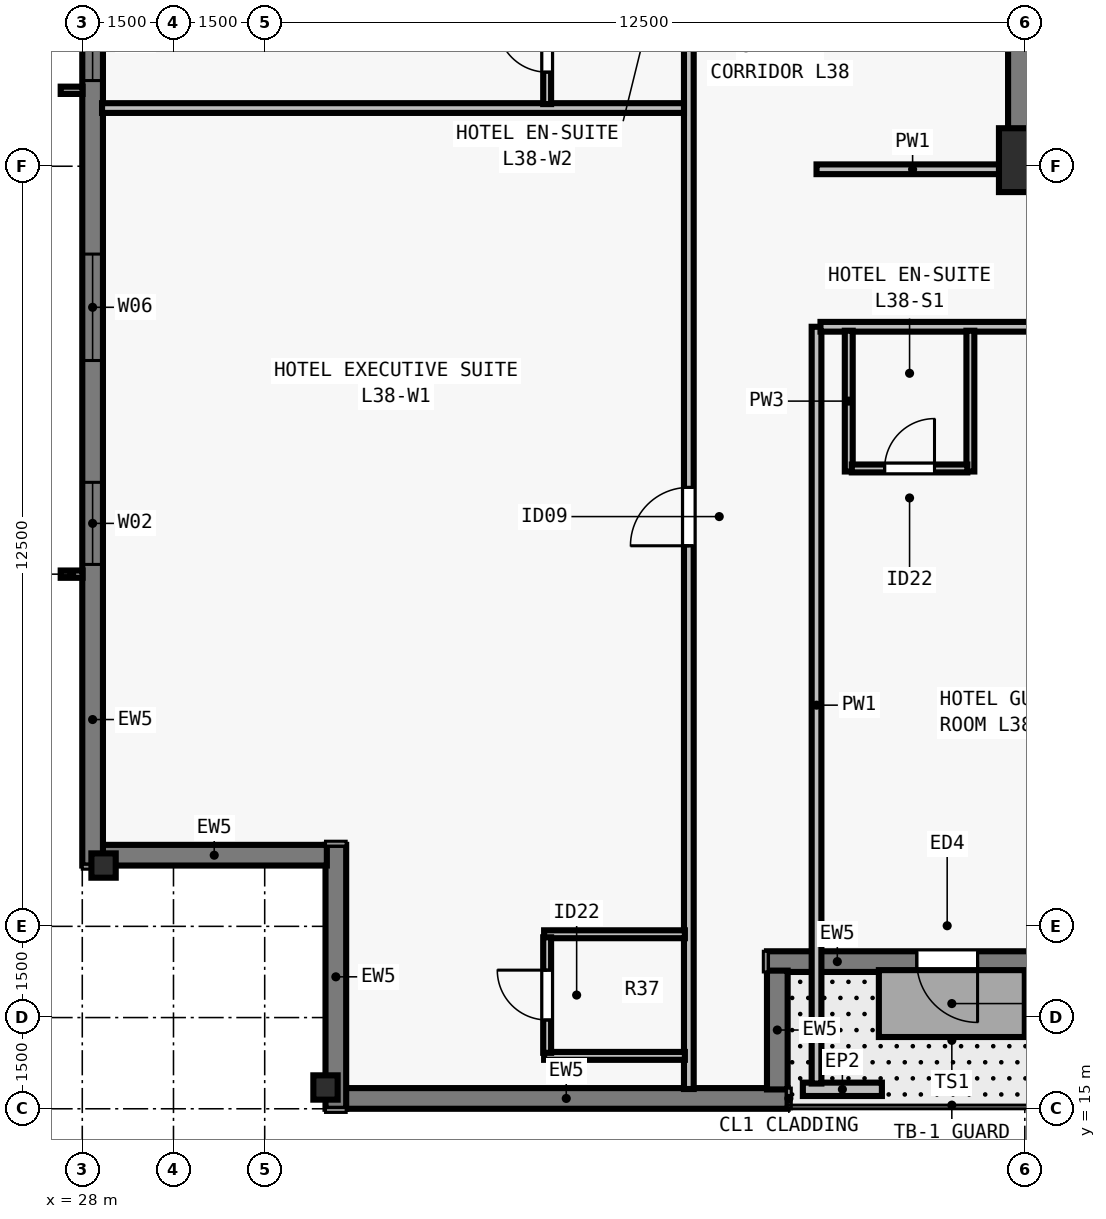
"""IFC4 building model, lengths in metres.
Left out: names, types, materials, properties, quantities, classifications, styles, units other than length and angle.
Written with IfcOpenShell. Run it as: python <this file> out.ifc"""

import sys

from ifc_helpers import new_model, si_unit, direction, frame, frame_2d, origin, origin_2d, place, context, subcontext, project, spatial, rectangle, i_section, extrude, element, fill, save


model = new_model("IFC4")
c1 = context("Model", 3, precision=1e-05, world=origin(), true_north=direction((0.0, 1.0)))
c2 = subcontext(c1, "Body", "Model", "MODEL_VIEW")
j1 = project(units=[si_unit("LENGTHUNIT", "METRE"), si_unit("PLANEANGLEUNIT", "RADIAN")], contexts=[c1])
p1 = place(None, origin())
s1 = spatial("IfcSite", under=j1, at=p1, CompositionType="ELEMENT")
p2 = place(p1, origin())
s2 = spatial("IfcBuilding", under=s1, at=p2, CompositionType="ELEMENT")
p3 = place(p2, frame((0.0, 0.0, 141.0)))
s3 = spatial("IfcBuildingStorey", under=s2, at=p3, CompositionType="ELEMENT", Elevation=141.0)
p4 = place(p3, frame((43.6, 30.6, 0.0), z_axis=(0.0, 0.0, 1.0), x_axis=(1.0, 0.0, 0.0)))
e1 = element("IfcColumn", 1, at=p4, inside=s3, PredefinedType="COLUMN", context=c2, shape_type="SweptSolid", body=[
    extrude(rectangle(XDim=1.05, YDim=1.05, at=origin_2d()), origin(), (0.0, 0.0, 1.0), 3.5),
])
for number, where, z_axis, x_axis in (
    (2, (32.0, 15.35, 0.0), (0.0, 0.0, 1.0), (1.0, 0.0, 0.0)),
    (3, (28.35, 19.0, 0.0), (0.0, 0.0, 1.0), (0.0, 1.0, 0.0)),
):
    element("IfcColumn", number, at=place(p3, frame(where, z_axis=z_axis, x_axis=x_axis)), inside=s3, PredefinedType="COLUMN", context=c2, shape_type="SweptSolid", body=[
        extrude(i_section(OverallWidth=0.4, OverallDepth=0.4, WebThickness=0.022, FlangeThickness=0.036, at=origin_2d()), origin(), (0.0, 0.0, 1.0), 3.5),
    ])
p5 = place(p3, frame((39.6, 15.17, 0.0), z_axis=(0.0, 0.0, 1.0), x_axis=(-1.0, 0.0, 0.0)))
e4 = element("IfcWall", 4, at=p5, inside=s3, PredefinedType="SOLIDWALL", context=c2, shape_type="SweptSolid", body=[
    extrude(rectangle(XDim=7.282, YDim=0.34, at=frame_2d((3.641, 0.0))), origin(), (0.0, 0.0, 1.0), 3.28),
])
p6 = place(p3, frame((32.17, 15.0, 0.0), z_axis=(0.0, 0.0, 1.0), x_axis=(0.0, 1.0, 0.0)))
e5 = element("IfcWall", 5, at=p6, inside=s3, PredefinedType="SOLIDWALL", context=c2, shape_type="SweptSolid", body=[
    extrude(rectangle(XDim=4.34, YDim=0.34, at=frame_2d((2.17, 0.0))), origin(), (0.0, 0.0, 1.0), 3.28),
])
p7 = place(p3, frame((32.022, 19.17, 0.0), z_axis=(0.0, 0.0, 1.0), x_axis=(-1.0, 0.0, 0.0)))
e6 = element("IfcWall", 6, at=p7, inside=s3, PredefinedType="SOLIDWALL", context=c2, shape_type="SweptSolid", body=[
    extrude(rectangle(XDim=3.704, YDim=0.34, at=frame_2d((1.852, 0.0))), origin(), (0.0, 0.0, 1.0), 3.28),
])
p8 = place(p3, frame((28.17, 19.0, 0.0), z_axis=(0.0, 0.0, 1.0), x_axis=(0.0, 1.0, 0.0)))
e7 = element("IfcWall", 7, at=p8, inside=s3, PredefinedType="SOLIDWALL", context=c2, shape_type="SweptSolid", body=[
    extrude(rectangle(XDim=39.682, YDim=0.34, at=frame_2d((19.841, 0.0))), origin(), (0.0, 0.0, 1.0), 3.28),
])
p9 = place(p8, frame((4.952, 0.0, 0.8)))
e8 = element("IfcOpeningElement", 8, at=p9, cuts=e7, PredefinedType="OPENING", context=c2, shape_type="SweptSolid", body=[
    extrude(rectangle(XDim=1.35, YDim=1.66, at=frame_2d((0.675, 0.83))), frame((0.0, 0.18, 0.0), z_axis=(0.0, -1.0, 0.0), x_axis=(1.0, 0.0, 0.0)), (0.0, 0.0, 1.0), 0.36),
])
p10 = place(p8, frame((8.305, 0.0, 0.8)))
e9 = element("IfcOpeningElement", 9, at=p10, cuts=e7, PredefinedType="OPENING", context=c2, shape_type="SweptSolid", body=[
    extrude(rectangle(XDim=1.75, YDim=1.66, at=frame_2d((0.875, 0.83))), frame((0.0, 0.18, 0.0), z_axis=(0.0, -1.0, 0.0), x_axis=(1.0, 0.0, 0.0)), (0.0, 0.0, 1.0), 0.36),
])
p11 = place(p8, frame((12.909, 0.0, 0.8)))
e10 = element("IfcOpeningElement", 10, at=p11, cuts=e7, PredefinedType="OPENING", context=c2, shape_type="SweptSolid", body=[
    extrude(rectangle(XDim=1.35, YDim=1.66, at=frame_2d((0.675, 0.83))), frame((0.0, 0.18, 0.0), z_axis=(0.0, -1.0, 0.0), x_axis=(1.0, 0.0, 0.0)), (0.0, 0.0, 1.0), 0.36),
])
p12 = place(p8, frame((16.262, 0.0, 0.8)))
e11 = element("IfcOpeningElement", 11, at=p12, cuts=e7, PredefinedType="OPENING", context=c2, shape_type="SweptSolid", body=[
    extrude(rectangle(XDim=1.75, YDim=1.66, at=frame_2d((0.875, 0.83))), frame((0.0, 0.18, 0.0), z_axis=(0.0, -1.0, 0.0), x_axis=(1.0, 0.0, 0.0)), (0.0, 0.0, 1.0), 0.36),
])
p13 = place(p8, frame((19.166, 0.0, 0.8)))
e12 = element("IfcOpeningElement", 12, at=p13, cuts=e7, PredefinedType="OPENING", context=c2, shape_type="SweptSolid", body=[
    extrude(rectangle(XDim=1.35, YDim=1.66, at=frame_2d((0.675, 0.83))), frame((0.0, 0.18, 0.0), z_axis=(0.0, -1.0, 0.0), x_axis=(1.0, 0.0, 0.0)), (0.0, 0.0, 1.0), 0.36),
])
p14 = place(p8, frame((22.07, 0.0, 0.8)))
e13 = element("IfcOpeningElement", 13, at=p14, cuts=e7, PredefinedType="OPENING", context=c2, shape_type="SweptSolid", body=[
    extrude(rectangle(XDim=1.75, YDim=1.66, at=frame_2d((0.875, 0.83))), frame((0.0, 0.18, 0.0), z_axis=(0.0, -1.0, 0.0), x_axis=(1.0, 0.0, 0.0)), (0.0, 0.0, 1.0), 0.36),
])
p15 = place(p8, frame((25.823, 0.0, 0.8)))
e14 = element("IfcOpeningElement", 14, at=p15, cuts=e7, PredefinedType="OPENING", context=c2, shape_type="SweptSolid", body=[
    extrude(rectangle(XDim=1.35, YDim=1.66, at=frame_2d((0.675, 0.83))), frame((0.0, 0.18, 0.0), z_axis=(0.0, -1.0, 0.0), x_axis=(1.0, 0.0, 0.0)), (0.0, 0.0, 1.0), 0.36),
])
p16 = place(p8, frame((29.627, 0.0, 0.8)))
e15 = element("IfcOpeningElement", 15, at=p16, cuts=e7, PredefinedType="OPENING", context=c2, shape_type="SweptSolid", body=[
    extrude(rectangle(XDim=1.75, YDim=1.66, at=frame_2d((0.875, 0.83))), frame((0.0, 0.18, 0.0), z_axis=(0.0, -1.0, 0.0), x_axis=(1.0, 0.0, 0.0)), (0.0, 0.0, 1.0), 0.36),
])
p17 = place(p8, frame((33.38, 0.0, 0.8)))
e16 = element("IfcOpeningElement", 16, at=p17, cuts=e7, PredefinedType="OPENING", context=c2, shape_type="SweptSolid", body=[
    extrude(rectangle(XDim=1.35, YDim=1.66, at=frame_2d((0.675, 0.83))), frame((0.0, 0.18, 0.0), z_axis=(0.0, -1.0, 0.0), x_axis=(1.0, 0.0, 0.0)), (0.0, 0.0, 1.0), 0.36),
])
p18 = place(p3, frame((45.022, 17.42, 0.0), z_axis=(0.0, 0.0, 1.0), x_axis=(-1.0, 0.0, 0.0)))
e17 = element("IfcWall", 17, at=p18, inside=s3, PredefinedType="SOLIDWALL", context=c2, shape_type="SweptSolid", body=[
    extrude(rectangle(XDim=5.762, YDim=0.34, at=frame_2d((2.881, 0.0))), origin(), (0.0, 0.0, 1.0), 3.28),
])
p19 = place(p18, frame((2.299, 0.0, 0.0)))
e18 = element("IfcOpeningElement", 18, at=p19, cuts=e17, PredefinedType="OPENING", context=c2, shape_type="SweptSolid", body=[
    extrude(rectangle(XDim=1.0, YDim=2.15, at=frame_2d((0.5, 1.075))), frame((0.0, 0.18, 0.0), z_axis=(0.0, -1.0, 0.0), x_axis=(1.0, 0.0, 0.0)), (0.0, 0.0, 1.0), 0.36),
])
p20 = place(p3, frame((39.43, 17.272, 0.0), z_axis=(0.0, 0.0, 1.0), x_axis=(0.0, -1.0, 0.0)))
e19 = element("IfcWall", 19, at=p20, inside=s3, PredefinedType="SOLIDWALL", context=c2, shape_type="SweptSolid", body=[
    extrude(rectangle(XDim=1.954, YDim=0.34, at=frame_2d((0.977, 0.0))), origin(), (0.0, 0.0, 1.0), 3.28),
])
p21 = place(p3, frame((39.85, 15.32, 0.0), z_axis=(0.0, 0.0, 1.0), x_axis=(1.0, 0.0, 0.0)))
e20 = element("IfcWall", 20, at=p21, inside=s3, PredefinedType="PARAPET", context=c2, shape_type="SweptSolid", body=[
    extrude(rectangle(XDim=1.3, YDim=0.22, at=frame_2d((0.65, 0.0))), origin(), (0.0, 0.0, 1.0), 0.55),
])
p22 = place(p3, frame((43.225, 30.5, 0.0), z_axis=(0.0, 0.0, 1.0), x_axis=(1.0, 0.0, 0.0)))
e21 = element("IfcWall", 21, at=p22, inside=s3, PredefinedType="SHEAR", context=c2, shape_type="SweptSolid", body=[
    extrude(rectangle(XDim=17.55, YDim=0.55, at=frame_2d((8.775, 0.0))), origin(), (0.0, 0.0, 1.0), 3.28),
])
p23 = place(p3, frame((43.5, 30.765, 0.0), z_axis=(0.0, 0.0, 1.0), x_axis=(0.0, 1.0, 0.0)))
e22 = element("IfcWall", 22, at=p23, inside=s3, PredefinedType="SHEAR", context=c2, shape_type="SweptSolid", body=[
    extrude(rectangle(XDim=7.985, YDim=0.55, at=frame_2d((3.993, 0.0))), origin(), (0.0, 0.0, 1.0), 3.28),
])
p24 = place(p3, frame((37.975, 15.325, 0.0), z_axis=(0.0, 0.0, 1.0), x_axis=(0.0, 1.0, 0.0)))
e23 = element("IfcWall", 23, at=p24, inside=s3, PredefinedType="PARTITIONING", context=c2, shape_type="SweptSolid", body=[
    extrude(rectangle(XDim=47.35, YDim=0.16, at=frame_2d((23.675, 0.0))), origin(), (0.0, 0.0, 1.0), 2.555),
])
p25 = place(p24, frame((8.934, 0.0, 0.0)))
e24 = element("IfcOpeningElement", 24, at=p25, cuts=e23, PredefinedType="OPENING", context=c2, shape_type="SweptSolid", body=[
    extrude(rectangle(XDim=0.96, YDim=2.15, at=frame_2d((0.48, 1.075))), frame((0.0, 0.09, 0.0), z_axis=(0.0, -1.0, 0.0), x_axis=(1.0, 0.0, 0.0)), (0.0, 0.0, 1.0), 0.18),
])
p26 = place(p24, frame((24.319, 0.0, 0.0)))
e25 = element("IfcOpeningElement", 25, at=p26, cuts=e23, PredefinedType="OPENING", context=c2, shape_type="SweptSolid", body=[
    extrude(rectangle(XDim=0.96, YDim=2.15, at=frame_2d((0.48, 1.075))), frame((0.0, 0.09, 0.0), z_axis=(0.0, -1.0, 0.0), x_axis=(1.0, 0.0, 0.0)), (0.0, 0.0, 1.0), 0.18),
])
p27 = place(p24, frame((39.88, 0.0, 0.0)))
e26 = element("IfcOpeningElement", 26, at=p27, cuts=e23, PredefinedType="OPENING", context=c2, shape_type="SweptSolid", body=[
    extrude(rectangle(XDim=0.96, YDim=2.15, at=frame_2d((0.48, 1.075))), frame((0.0, 0.09, 0.0), z_axis=(0.0, -1.0, 0.0), x_axis=(1.0, 0.0, 0.0)), (0.0, 0.0, 1.0), 0.18),
])
p28 = place(p3, frame((40.075, 15.415, 0.0), z_axis=(0.0, 0.0, 1.0), x_axis=(0.0, 1.0, 0.0)))
e27 = element("IfcWall", 27, at=p28, inside=s3, PredefinedType="PARTITIONING", context=c2, shape_type="SweptSolid", body=[
    extrude(rectangle(XDim=12.445, YDim=0.16, at=frame_2d((6.223, 0.0))), origin(), (0.0, 0.0, 1.0), 2.555),
])
p29 = place(p3, frame((40.075, 30.45, 0.0), z_axis=(0.0, 0.0, 1.0), x_axis=(1.0, 0.0, 0.0)))
e28 = element("IfcWall", 28, at=p29, inside=s3, PredefinedType="PARTITIONING", context=c2, shape_type="SweptSolid", body=[
    extrude(rectangle(XDim=3.16, YDim=0.16, at=frame_2d((1.58, 0.0))), origin(), (0.0, 0.0, 1.0), 3.28),
])
p30 = place(p3, frame((40.14, 27.86, 0.0), z_axis=(0.0, 0.0, 1.0), x_axis=(1.0, 0.0, 0.0)))
e29 = element("IfcWall", 29, at=p30, inside=s3, PredefinedType="PARTITIONING", context=c2, shape_type="SweptSolid", body=[
    extrude(rectangle(XDim=22.07, YDim=0.16, at=frame_2d((11.035, 0.0))), origin(), (0.0, 0.0, 1.0), 3.28),
])
p31 = place(p30, frame((3.834, 0.0, 0.0)))
e30 = element("IfcOpeningElement", 30, at=p31, cuts=e29, PredefinedType="OPENING", context=c2, shape_type="SweptSolid", body=[
    extrude(rectangle(XDim=0.96, YDim=2.15, at=frame_2d((0.48, 1.075))), frame((0.0, 0.09, 0.0), z_axis=(0.0, -1.0, 0.0), x_axis=(1.0, 0.0, 0.0)), (0.0, 0.0, 1.0), 0.18),
])
p32 = place(p30, frame((8.746, 0.0, 0.0)))
e31 = element("IfcOpeningElement", 31, at=p32, cuts=e29, PredefinedType="OPENING", context=c2, shape_type="SweptSolid", body=[
    extrude(rectangle(XDim=0.96, YDim=2.15, at=frame_2d((0.48, 1.075))), frame((0.0, 0.09, 0.0), z_axis=(0.0, -1.0, 0.0), x_axis=(1.0, 0.0, 0.0)), (0.0, 0.0, 1.0), 0.18),
])
p33 = place(p30, frame((14.46, 0.0, 0.0)))
e32 = element("IfcOpeningElement", 32, at=p33, cuts=e29, PredefinedType="OPENING", context=c2, shape_type="SweptSolid", body=[
    extrude(rectangle(XDim=0.96, YDim=2.15, at=frame_2d((0.48, 1.075))), frame((0.0, 0.09, 0.0), z_axis=(0.0, -1.0, 0.0), x_axis=(1.0, 0.0, 0.0)), (0.0, 0.0, 1.0), 0.18),
])
p34 = place(p30, frame((19.993, 0.0, 0.0)))
e33 = element("IfcOpeningElement", 33, at=p34, cuts=e29, PredefinedType="OPENING", context=c2, shape_type="SweptSolid", body=[
    extrude(rectangle(XDim=0.96, YDim=2.15, at=frame_2d((0.48, 1.075))), frame((0.0, 0.09, 0.0), z_axis=(0.0, -1.0, 0.0), x_axis=(1.0, 0.0, 0.0)), (0.0, 0.0, 1.0), 0.18),
])
p35 = place(p3, frame((40.605, 25.48, 0.0), z_axis=(0.0, 0.0, 1.0), x_axis=(0.0, 1.0, 0.0)))
e34 = element("IfcWall", 34, at=p35, inside=s3, PredefinedType="PLUMBINGWALL", context=c2, shape_type="SweptSolid", body=[
    extrude(rectangle(XDim=2.315, YDim=0.13, at=frame_2d((1.157, 0.0))), origin(), (0.0, 0.0, 1.0), 2.555),
])
p36 = place(p3, frame((42.605, 25.48, 0.0), z_axis=(0.0, 0.0, 1.0), x_axis=(0.0, 1.0, 0.0)))
e35 = element("IfcWall", 35, at=p36, inside=s3, PredefinedType="PLUMBINGWALL", context=c2, shape_type="SweptSolid", body=[
    extrude(rectangle(XDim=2.315, YDim=0.13, at=frame_2d((1.157, 0.0))), origin(), (0.0, 0.0, 1.0), 3.28),
])
p37 = place(p3, frame((40.655, 25.53, 0.0), z_axis=(0.0, 0.0, 1.0), x_axis=(1.0, 0.0, 0.0)))
e36 = element("IfcWall", 36, at=p37, inside=s3, PredefinedType="PLUMBINGWALL", context=c2, shape_type="SweptSolid", body=[
    extrude(rectangle(XDim=1.9, YDim=0.13, at=frame_2d((0.95, 0.0))), origin(), (0.0, 0.0, 1.0), 3.28),
])
p38 = place(p37, frame((0.54, 0.0, 0.0)))
e37 = element("IfcOpeningElement", 37, at=p38, cuts=e36, PredefinedType="OPENING", context=c2, shape_type="SweptSolid", body=[
    extrude(rectangle(XDim=0.82, YDim=2.1, at=frame_2d((0.41, 1.05))), frame((0.0, 0.075, 0.0), z_axis=(0.0, -1.0, 0.0), x_axis=(1.0, 0.0, 0.0)), (0.0, 0.0, 1.0), 0.15),
])
for number, where, z_axis, x_axis in (
    (38, (35.595, 15.87, 0.0), (0.0, 0.0, 1.0), (1.0, 0.0, 0.0)),
    (39, (35.595, 17.87, 0.0), (0.0, 0.0, 1.0), (1.0, 0.0, 0.0)),
):
    element("IfcWall", number, at=place(p3, frame(where, z_axis=z_axis, x_axis=x_axis)), inside=s3, PredefinedType="PLUMBINGWALL", context=c2, shape_type="SweptSolid", body=[
        extrude(rectangle(XDim=2.315, YDim=0.13, at=frame_2d((1.157, 0.0))), origin(), (0.0, 0.0, 1.0), 3.28),
    ])
p39 = place(p3, frame((35.645, 15.92, 0.0), z_axis=(0.0, 0.0, 1.0), x_axis=(0.0, 1.0, 0.0)))
e40 = element("IfcWall", 40, at=p39, inside=s3, PredefinedType="PLUMBINGWALL", context=c2, shape_type="SweptSolid", body=[
    extrude(rectangle(XDim=1.9, YDim=0.13, at=frame_2d((0.95, 0.0))), origin(), (0.0, 0.0, 1.0), 3.28),
])
p40 = place(p39, frame((0.54, 0.0, 0.0)))
e41 = element("IfcOpeningElement", 41, at=p40, cuts=e40, PredefinedType="OPENING", context=c2, shape_type="SweptSolid", body=[
    extrude(rectangle(XDim=0.82, YDim=2.1, at=frame_2d((0.41, 1.05))), frame((0.0, 0.075, 0.0), z_axis=(0.0, -1.0, 0.0), x_axis=(1.0, 0.0, 0.0)), (0.0, 0.0, 1.0), 0.15),
])
p41 = place(p3, frame((28.325, 31.457, 0.0), z_axis=(0.0, 0.0, 1.0), x_axis=(1.0, 0.0, 0.0)))
e42 = element("IfcWall", 42, at=p41, inside=s3, PredefinedType="PARTITIONING", context=c2, shape_type="SweptSolid", body=[
    extrude(rectangle(XDim=9.57, YDim=0.16, at=frame_2d((4.785, 0.0))), origin(), (0.0, 0.0, 1.0), 3.28),
])
p42 = place(p3, frame((35.645, 31.522, 0.0), z_axis=(0.0, 0.0, 1.0), x_axis=(0.0, 1.0, 0.0)))
e43 = element("IfcWall", 43, at=p42, inside=s3, PredefinedType="PLUMBINGWALL", context=c2, shape_type="SweptSolid", body=[
    extrude(rectangle(XDim=1.885, YDim=0.13, at=frame_2d((0.942, 0.0))), origin(), (0.0, 0.0, 1.0), 3.28),
])
p43 = place(p42, frame((0.525, 0.0, 0.0)))
e44 = element("IfcOpeningElement", 44, at=p43, cuts=e43, PredefinedType="OPENING", context=c2, shape_type="SweptSolid", body=[
    extrude(rectangle(XDim=0.82, YDim=2.1, at=frame_2d((0.41, 1.05))), frame((0.0, 0.075, 0.0), z_axis=(0.0, -1.0, 0.0), x_axis=(1.0, 0.0, 0.0)), (0.0, 0.0, 1.0), 0.15),
])
p44 = place(p9, origin())
e45 = element("IfcWindow", 45, at=p44, inside=s3, PartitioningType="SINGLE_PANEL", PredefinedType="WINDOW", context=c2, shape_type="SweptSolid", body=[
    extrude(rectangle(XDim=1.35, YDim=1.66, at=frame_2d((0.675, 0.83))), frame((0.0, -0.05, 0.0), z_axis=(0.0, -1.0, 0.0), x_axis=(1.0, 0.0, 0.0)), (0.0, 0.0, 1.0), 0.06),
])
fill(e8, e45)
p45 = place(p10, origin())
e46 = element("IfcWindow", 46, at=p45, inside=s3, PartitioningType="SINGLE_PANEL", PredefinedType="WINDOW", context=c2, shape_type="SweptSolid", body=[
    extrude(rectangle(XDim=1.75, YDim=1.66, at=frame_2d((0.875, 0.83))), frame((0.0, -0.05, 0.0), z_axis=(0.0, -1.0, 0.0), x_axis=(1.0, 0.0, 0.0)), (0.0, 0.0, 1.0), 0.06),
])
fill(e9, e46)
p46 = place(p11, origin())
e47 = element("IfcWindow", 47, at=p46, inside=s3, PartitioningType="SINGLE_PANEL", PredefinedType="WINDOW", context=c2, shape_type="SweptSolid", body=[
    extrude(rectangle(XDim=1.35, YDim=1.66, at=frame_2d((0.675, 0.83))), frame((0.0, -0.05, 0.0), z_axis=(0.0, -1.0, 0.0), x_axis=(1.0, 0.0, 0.0)), (0.0, 0.0, 1.0), 0.06),
])
fill(e10, e47)
p47 = place(p19, origin())
e48 = element("IfcDoor", 48, at=p47, inside=s3, OperationType="SINGLE_SWING_LEFT", PredefinedType="DOOR", context=c2, shape_type="SweptSolid", body=[
    extrude(rectangle(XDim=1.0, YDim=2.15, at=frame_2d((0.5, 1.075))), frame((0.0, 0.025, 0.0), z_axis=(0.0, -1.0, 0.0), x_axis=(1.0, 0.0, 0.0)), (0.0, 0.0, 1.0), 0.05),
])
fill(e18, e48)
p48 = place(p38, origin())
e49 = element("IfcDoor", 49, at=p48, inside=s3, OperationType="SINGLE_SWING_RIGHT", PredefinedType="DOOR", context=c2, shape_type="SweptSolid", body=[
    extrude(rectangle(XDim=0.82, YDim=2.1, at=frame_2d((0.41, 1.05))), frame((0.0, 0.025, 0.0), z_axis=(0.0, -1.0, 0.0), x_axis=(1.0, 0.0, 0.0)), (0.0, 0.0, 1.0), 0.05),
])
fill(e37, e49)
p49 = place(p40, origin())
e50 = element("IfcDoor", 50, at=p49, inside=s3, OperationType="SINGLE_SWING_RIGHT", PredefinedType="DOOR", context=c2, shape_type="SweptSolid", body=[
    extrude(rectangle(XDim=0.82, YDim=2.1, at=frame_2d((0.41, 1.05))), frame((0.0, 0.025, 0.0), z_axis=(0.0, -1.0, 0.0), x_axis=(1.0, 0.0, 0.0)), (0.0, 0.0, 1.0), 0.05),
])
fill(e41, e50)
p50 = place(p25, origin())
e51 = element("IfcDoor", 51, at=p50, inside=s3, OperationType="SINGLE_SWING_LEFT", PredefinedType="DOOR", context=c2, shape_type="SweptSolid", body=[
    extrude(rectangle(XDim=0.96, YDim=2.15, at=frame_2d((0.48, 1.075))), frame((0.0, 0.025, 0.0), z_axis=(0.0, -1.0, 0.0), x_axis=(1.0, 0.0, 0.0)), (0.0, 0.0, 1.0), 0.05),
])
fill(e24, e51)
p51 = place(p43, origin())
e52 = element("IfcDoor", 52, at=p51, inside=s3, OperationType="SINGLE_SWING_RIGHT", PredefinedType="DOOR", context=c2, shape_type="SweptSolid", body=[
    extrude(rectangle(XDim=0.82, YDim=2.1, at=frame_2d((0.41, 1.05))), frame((0.0, 0.025, 0.0), z_axis=(0.0, -1.0, 0.0), x_axis=(1.0, 0.0, 0.0)), (0.0, 0.0, 1.0), 0.05),
])
fill(e44, e52)
save(model, sys.argv[1])
